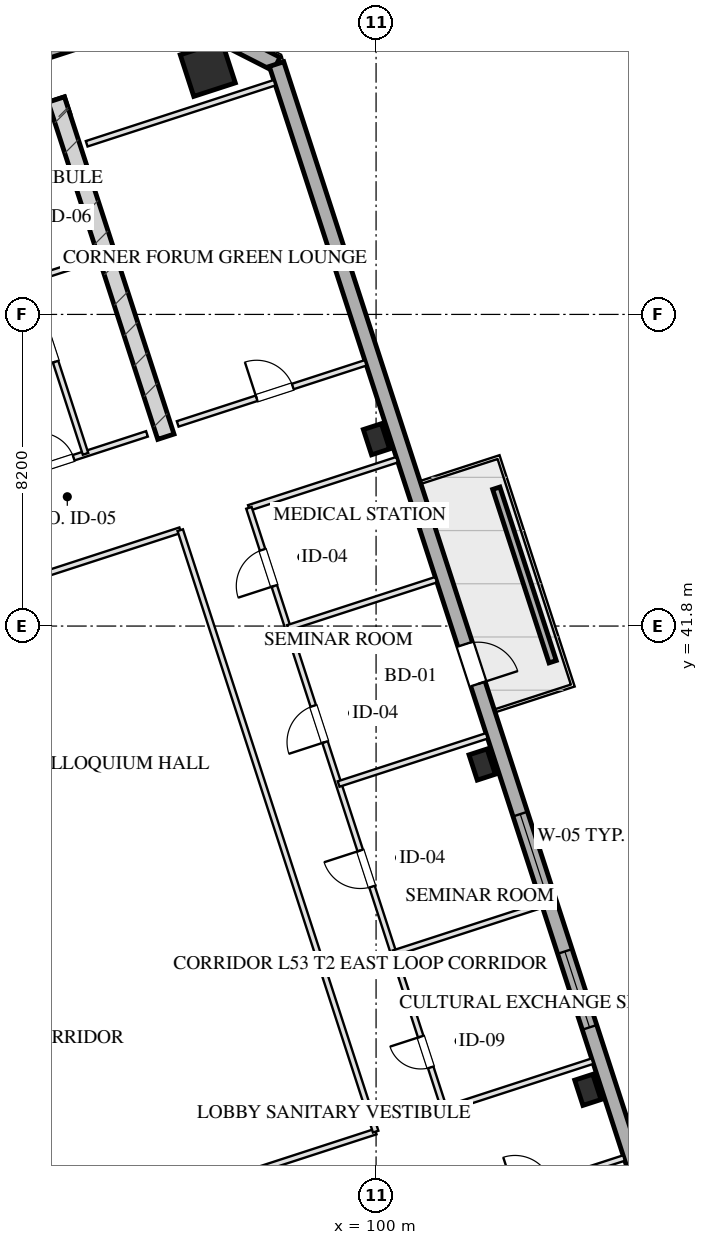
"""IFC4 building model, lengths in metres.
Left out: names, types, materials, properties, quantities, classifications, styles, units other than length and angle.
Written with IfcOpenShell. Run it as: python <this file> out.ifc"""

import sys

from ifc_helpers import new_model, si_unit, direction, frame, frame_2d, origin, origin_2d, place, context, subcontext, project, spatial, rectangle, hollow_rectangle, extrude, element, fill, save


model = new_model("IFC4")
c1 = context("Model", 3, precision=1e-05, world=origin(), true_north=direction((0.0, 1.0)))
c2 = subcontext(c1, "Body", "Model", "MODEL_VIEW")
j1 = project(units=[si_unit("LENGTHUNIT", "METRE"), si_unit("PLANEANGLEUNIT", "RADIAN")], contexts=[c1])
p1 = place(None, origin())
s1 = spatial("IfcSite", under=j1, at=p1, CompositionType="ELEMENT")
p2 = place(p1, origin())
s2 = spatial("IfcBuilding", under=s1, at=p2, CompositionType="ELEMENT")
p3 = place(p2, frame((0.0, 0.0, 198.95)))
s3 = spatial("IfcBuildingStorey", under=s2, at=p3, CompositionType="ELEMENT", Elevation=198.95)
p4 = place(p3, frame((76.415, 50.489, 0.0), z_axis=(0.0, 0.0, 1.0), x_axis=(0.951056810414, 0.309016089169, 0.0)))
e1 = element("IfcWall", 1, at=p4, inside=s3, PredefinedType="SHEAR", context=c2, shape_type="SweptSolid", body=[
    extrude(rectangle(XDim=16.25, YDim=0.45, at=frame_2d((8.125, 0.0))), origin(), (0.0, 0.0, 1.0), 3.45),
])
p5 = place(p3, frame((94.469, 46.781, 0.0), z_axis=(0.0, 0.0, 1.0), x_axis=(-0.309004419953, 0.951060601881, 0.0)))
e2 = element("IfcWall", 2, at=p5, inside=s3, PredefinedType="SHEAR", context=c2, shape_type="SweptSolid", body=[
    extrude(rectangle(XDim=9.33, YDim=0.45, at=frame_2d((4.665, 0.0))), origin(), (0.0, 0.0, 1.0), 3.45),
])
p6 = place(p3, frame((95.572, 56.461, 0.0), z_axis=(0.0, 0.0, 1.0), x_axis=(0.951056516295, 0.309016994375, 0.0)))
e3 = element("IfcColumn", 3, at=p6, inside=s3, PredefinedType="COLUMN", context=c2, shape_type="SweptSolid", body=[
    extrude(hollow_rectangle(XDim=1.15, YDim=1.15, WallThickness=0.04, at=origin_2d()), origin(), (0.0, 0.0, 1.0), 3.451),
])
for number, where, z_axis, x_axis in (
    (4, (105.573, 29.597, 0.0), (0.0, 0.0, 1.0), (0.951, 0.309, 0.0)),
    (5, (102.792, 38.156, 0.0), (0.0, 0.0, 1.0), (0.951, 0.309, 0.0)),
    (6, (100.01, 46.716, 0.0), (0.0, 0.0, 1.0), (0.951, 0.309, 0.0)),
):
    element("IfcColumn", number, at=place(p3, frame(where, z_axis=z_axis, x_axis=x_axis)), inside=s3, PredefinedType="COLUMN", context=c2, shape_type="SweptSolid", body=[
        extrude(hollow_rectangle(XDim=0.5, YDim=0.7, WallThickness=0.025, at=origin_2d()), origin(), (0.0, 0.0, 1.0), 3.451),
    ])
p7 = place(p3, frame((72.165, 50.706, 0.0), z_axis=(0.0, 0.0, 1.0), x_axis=(0.951058012937, 0.309012388148, 0.0)))
e7 = element("IfcWall", 7, at=p7, inside=s3, PredefinedType="SOLIDWALL", context=c2, shape_type="SweptSolid", body=[
    extrude(rectangle(XDim=23.6, YDim=0.4, at=frame_2d((11.8, 0.0))), origin(), (0.0, 0.0, 1.0), 2.61),
])
p8 = place(p3, frame((94.61, 57.999, 0.0), z_axis=(0.0, 0.0, 1.0), x_axis=(0.890979603174, -0.454043331334, 0.0)))
e8 = element("IfcWall", 8, at=p8, inside=s3, PredefinedType="SOLIDWALL", context=c2, shape_type="SweptSolid", body=[
    extrude(rectangle(XDim=3.111, YDim=0.4, at=frame_2d((1.556, 0.0))), origin(), (0.0, 0.0, 1.0), 2.61),
])
p9 = place(p3, frame((97.382, 56.586, 0.0), z_axis=(0.0, 0.0, 1.0), x_axis=(0.309016491071, -0.951056679828, 0.0)))
e9 = element("IfcWall", 9, at=p9, inside=s3, PredefinedType="SOLIDWALL", context=c2, shape_type="SweptSolid", body=[
    extrude(rectangle(XDim=38.4, YDim=0.4, at=frame_2d((19.2, 0.0))), origin(), (0.0, 0.0, 1.0), 2.61),
])
p10 = place(p9, frame((24.55, 0.0, 0.75)))
e10 = element("IfcOpeningElement", 10, at=p10, cuts=e9, PredefinedType="OPENING", context=c2, shape_type="SweptSolid", body=[
    extrude(rectangle(XDim=2.1, YDim=1.46, at=frame_2d((1.05, 0.73))), frame((0.0, 0.21, 0.0), z_axis=(0.0, -1.0, 0.0), x_axis=(1.0, 0.0, 0.0)), (0.0, 0.0, 1.0), 0.42),
])
p11 = place(p9, frame((20.75, 0.0, 0.75)))
e11 = element("IfcOpeningElement", 11, at=p11, cuts=e9, PredefinedType="OPENING", context=c2, shape_type="SweptSolid", body=[
    extrude(rectangle(XDim=2.1, YDim=1.46, at=frame_2d((1.05, 0.73))), frame((0.0, 0.21, 0.0), z_axis=(0.0, -1.0, 0.0), x_axis=(1.0, 0.0, 0.0)), (0.0, 0.0, 1.0), 0.42),
])
p12 = place(p9, frame((16.05, 0.0, 0.0)))
e12 = element("IfcOpeningElement", 12, at=p12, cuts=e9, PredefinedType="OPENING", context=c2, shape_type="SweptSolid", body=[
    extrude(rectangle(XDim=1.1, YDim=2.15, at=frame_2d((0.55, 1.075))), frame((0.0, 0.21, 0.0), z_axis=(0.0, -1.0, 0.0), x_axis=(1.0, 0.0, 0.0)), (0.0, 0.0, 1.0), 0.42),
])
p13 = place(p3, frame((104.646, 40.862, 0.0), z_axis=(0.0, 0.0, 1.0), x_axis=(-0.309032019345, 0.951051634255, 0.0)))
e13 = element("IfcWall", 13, at=p13, inside=s3, PredefinedType="PARAPET", context=c2, shape_type="SweptSolid", body=[
    extrude(rectangle(XDim=4.8, YDim=0.2, at=frame_2d((2.4, 0.0))), origin(), (0.0, 0.0, 1.0), 0.75),
])
p14 = place(p3, frame((90.928, 45.868, 0.0), z_axis=(0.0, 0.0, 1.0), x_axis=(0.951059297078, 0.309008435874, 0.0)))
e14 = element("IfcWall", 14, at=p14, inside=s3, PredefinedType="PARTITIONING", context=c2, shape_type="SweptSolid", body=[
    extrude(rectangle(XDim=3.2, YDim=0.15, at=frame_2d((1.6, 0.0))), origin(), (0.0, 0.0, 1.0), 3.175),
])
p15 = place(p14, frame((0.22, 0.0, 0.0)))
e15 = element("IfcOpeningElement", 15, at=p15, cuts=e14, PredefinedType="OPENING", context=c2, shape_type="SweptSolid", body=[
    extrude(rectangle(XDim=0.95, YDim=2.05, at=frame_2d((0.475, 1.025))), frame((0.0, 0.085, 0.0), z_axis=(0.0, -1.0, 0.0), x_axis=(1.0, 0.0, 0.0)), (0.0, 0.0, 1.0), 0.17),
])
p16 = place(p3, frame((92.355, 46.331, 0.0), z_axis=(0.0, 0.0, 1.0), x_axis=(-0.309007490203, 0.951059604335, 0.0)))
e16 = element("IfcWall", 16, at=p16, inside=s3, PredefinedType="PARTITIONING", context=c2, shape_type="SweptSolid", body=[
    extrude(rectangle(XDim=8.43, YDim=0.15, at=frame_2d((4.215, 0.0))), origin(), (0.0, 0.0, 1.0), 3.175),
])
p17 = place(p16, frame((2.55, 0.0, 0.0)))
e17 = element("IfcOpeningElement", 17, at=p17, cuts=e16, PredefinedType="OPENING", context=c2, shape_type="SweptSolid", body=[
    extrude(rectangle(XDim=0.95, YDim=2.05, at=frame_2d((0.475, 1.025))), frame((0.0, 0.085, 0.0), z_axis=(0.0, -1.0, 0.0), x_axis=(1.0, 0.0, 0.0)), (0.0, 0.0, 1.0), 0.17),
])
p18 = place(p16, frame((5.8, 0.0, 0.0)))
e18 = element("IfcOpeningElement", 18, at=p18, cuts=e16, PredefinedType="OPENING", context=c2, shape_type="SweptSolid", body=[
    extrude(rectangle(XDim=0.9, YDim=2.05, at=frame_2d((0.45, 1.025))), frame((0.0, 0.085, 0.0), z_axis=(0.0, -1.0, 0.0), x_axis=(1.0, 0.0, 0.0)), (0.0, 0.0, 1.0), 0.17),
])
p19 = place(p3, frame((90.871, 50.896, 0.0), z_axis=(0.0, 0.0, 1.0), x_axis=(0.951054116971, 0.309024378638, 0.0)))
e19 = element("IfcWall", 19, at=p19, inside=s3, PredefinedType="PARTITIONING", context=c2, shape_type="SweptSolid", body=[
    extrude(rectangle(XDim=1.7, YDim=0.15, at=frame_2d((0.85, 0.0))), origin(), (0.0, 0.0, 1.0), 3.175),
])
p20 = place(p3, frame((101.578, 26.196, 0.0), z_axis=(0.0, 0.0, 1.0), x_axis=(0.951064427824, 0.308992644131, 0.0)))
e20 = element("IfcWall", 20, at=p20, inside=s3, PredefinedType="PARTITIONING", context=c2, shape_type="SweptSolid", body=[
    extrude(rectangle(XDim=5.2, YDim=0.15, at=frame_2d((2.6, 0.0))), origin(), (0.0, 0.0, 1.0), 3.175),
])
p21 = place(p20, frame((2.184, 0.0, 0.0)))
e21 = element("IfcOpeningElement", 21, at=p21, cuts=e20, PredefinedType="OPENING", context=c2, shape_type="SweptSolid", body=[
    extrude(rectangle(XDim=1.0, YDim=2.05, at=frame_2d((0.5, 1.025))), frame((0.0, 0.085, 0.0), z_axis=(0.0, -1.0, 0.0), x_axis=(1.0, 0.0, 0.0)), (0.0, 0.0, 1.0), 0.17),
])
p22 = place(p3, frame((92.385, 54.49, 0.0), z_axis=(0.0, 0.0, 1.0), x_axis=(0.951055112834, 0.309021313752, 0.0)))
e22 = element("IfcWall", 22, at=p22, inside=s3, PredefinedType="PARTITIONING", context=c2, shape_type="SweptSolid", body=[
    extrude(rectangle(XDim=5.2, YDim=0.15, at=frame_2d((2.6, 0.0))), origin(), (0.0, 0.0, 1.0), 3.175),
])
p23 = place(p3, frame((94.78, 47.119, 0.0), z_axis=(0.0, 0.0, 1.0), x_axis=(0.951055112834, 0.309021313752, 0.0)))
e23 = element("IfcWall", 23, at=p23, inside=s3, PredefinedType="PARTITIONING", context=c2, shape_type="SweptSolid", body=[
    extrude(rectangle(XDim=5.2, YDim=0.15, at=frame_2d((2.6, 0.0))), origin(), (0.0, 0.0, 1.0), 3.175),
])
p24 = place(p23, frame((2.184, 0.0, 0.0)))
e24 = element("IfcOpeningElement", 24, at=p24, cuts=e23, PredefinedType="OPENING", context=c2, shape_type="SweptSolid", body=[
    extrude(rectangle(XDim=1.0, YDim=2.05, at=frame_2d((0.5, 1.025))), frame((0.0, 0.085, 0.0), z_axis=(0.0, -1.0, 0.0), x_axis=(1.0, 0.0, 0.0)), (0.0, 0.0, 1.0), 0.17),
])
p25 = place(p3, frame((91.097, 25.608, 0.0), z_axis=(0.0, 0.0, 1.0), x_axis=(0.951053063704, 0.309027620156, 0.0)))
e25 = element("IfcWall", 25, at=p25, inside=s3, PredefinedType="PARTITIONING", context=c2, shape_type="SweptSolid", body=[
    extrude(rectangle(XDim=9.35, YDim=0.15, at=frame_2d((4.675, 0.0))), origin(), (0.0, 0.0, 1.0), 3.175),
])
p26 = place(p3, frame((101.796, 29.085, 0.0), z_axis=(0.0, 0.0, 1.0), x_axis=(0.951061634685, 0.309001241148, 0.0)))
e26 = element("IfcWall", 26, at=p26, inside=s3, PredefinedType="PARTITIONING", context=c2, shape_type="SweptSolid", body=[
    extrude(rectangle(XDim=4.1, YDim=0.15, at=frame_2d((2.05, 0.0))), origin(), (0.0, 0.0, 1.0), 3.175),
])
p27 = place(p3, frame((85.955, 41.434, 0.0), z_axis=(0.0, 0.0, 1.0), x_axis=(0.951053063704, 0.309027620156, 0.0)))
e27 = element("IfcWall", 27, at=p27, inside=s3, PredefinedType="PARTITIONING", context=c2, shape_type="SweptSolid", body=[
    extrude(rectangle(XDim=9.35, YDim=0.15, at=frame_2d((4.675, 0.0))), origin(), (0.0, 0.0, 1.0), 3.175),
])
p28 = place(p3, frame((96.654, 44.91, 0.0), z_axis=(0.0, 0.0, 1.0), x_axis=(0.951044133184, 0.309055103076, 0.0)))
e28 = element("IfcWall", 28, at=p28, inside=s3, PredefinedType="PARTITIONING", context=c2, shape_type="SweptSolid", body=[
    extrude(rectangle(XDim=4.1, YDim=0.15, at=frame_2d((2.05, 0.0))), origin(), (0.0, 0.0, 1.0), 3.175),
])
p29 = place(p3, frame((99.989, 28.498, 0.0), z_axis=(0.0, 0.0, 1.0), x_axis=(-0.30901773025, 0.951056277195, 0.0)))
e29 = element("IfcWall", 29, at=p29, inside=s3, PredefinedType="PARTITIONING", context=c2, shape_type="SweptSolid", body=[
    extrude(rectangle(XDim=16.64, YDim=0.15, at=frame_2d((8.32, 0.0))), origin(), (0.0, 0.0, 1.0), 3.175),
])
p30 = place(p3, frame((101.796, 29.085, 0.0), z_axis=(0.0, 0.0, 1.0), x_axis=(-0.309022042254, 0.951054876125, 0.0)))
e30 = element("IfcWall", 30, at=p30, inside=s3, PredefinedType="PARTITIONING", context=c2, shape_type="SweptSolid", body=[
    extrude(rectangle(XDim=16.64, YDim=0.15, at=frame_2d((8.32, 0.0))), origin(), (0.0, 0.0, 1.0), 3.175),
])
p31 = place(p30, frame((1.16, 0.0, 0.0)))
e31 = element("IfcOpeningElement", 31, at=p31, cuts=e30, PredefinedType="OPENING", context=c2, shape_type="SweptSolid", body=[
    extrude(rectangle(XDim=0.85, YDim=2.05, at=frame_2d((0.425, 1.025))), frame((0.0, 0.085, 0.0), z_axis=(0.0, -1.0, 0.0), x_axis=(1.0, 0.0, 0.0)), (0.0, 0.0, 1.0), 0.17),
])
p32 = place(p30, frame((6.16, 0.0, 0.0)))
e32 = element("IfcOpeningElement", 32, at=p32, cuts=e30, PredefinedType="OPENING", context=c2, shape_type="SweptSolid", body=[
    extrude(rectangle(XDim=1.0, YDim=2.05, at=frame_2d((0.5, 1.025))), frame((0.0, 0.085, 0.0), z_axis=(0.0, -1.0, 0.0), x_axis=(1.0, 0.0, 0.0)), (0.0, 0.0, 1.0), 0.17),
])
p33 = place(p30, frame((10.16, 0.0, 0.0)))
e33 = element("IfcOpeningElement", 33, at=p33, cuts=e30, PredefinedType="OPENING", context=c2, shape_type="SweptSolid", body=[
    extrude(rectangle(XDim=1.0, YDim=2.05, at=frame_2d((0.5, 1.025))), frame((0.0, 0.085, 0.0), z_axis=(0.0, -1.0, 0.0), x_axis=(1.0, 0.0, 0.0)), (0.0, 0.0, 1.0), 0.17),
])
p34 = place(p30, frame((14.48, 0.0, 0.0)))
e34 = element("IfcOpeningElement", 34, at=p34, cuts=e30, PredefinedType="OPENING", context=c2, shape_type="SweptSolid", body=[
    extrude(rectangle(XDim=1.0, YDim=2.05, at=frame_2d((0.5, 1.025))), frame((0.0, 0.085, 0.0), z_axis=(0.0, -1.0, 0.0), x_axis=(1.0, 0.0, 0.0)), (0.0, 0.0, 1.0), 0.17),
])
p35 = place(p3, frame((100.461, 33.193, 0.0), z_axis=(0.0, 0.0, 1.0), x_axis=(0.951061634685, 0.309001241148, 0.0)))
e35 = element("IfcWall", 35, at=p35, inside=s3, PredefinedType="PARTITIONING", context=c2, shape_type="SweptSolid", body=[
    extrude(rectangle(XDim=4.1, YDim=0.15, at=frame_2d((2.05, 0.0))), origin(), (0.0, 0.0, 1.0), 3.175),
])
for number, where, z_axis, x_axis in (
    (36, (99.015, 37.644, 0.0), (0.0, 0.0, 1.0), (0.951, 0.309, 0.0)),
    (37, (97.68, 41.753, 0.0), (0.0, 0.0, 1.0), (0.951, 0.309, 0.0)),
):
    element("IfcWall", number, at=place(p3, frame(where, z_axis=z_axis, x_axis=x_axis)), inside=s3, PredefinedType="PARTITIONING", context=c2, shape_type="SweptSolid", body=[
        extrude(rectangle(XDim=4.1, YDim=0.15, at=frame_2d((2.05, 0.0))), origin(), (0.0, 0.0, 1.0), 3.175),
    ])
p36 = place(p10, origin())
e38 = element("IfcWindow", 38, at=p36, inside=s3, PartitioningType="TRIPLE_PANEL_VERTICAL", PredefinedType="WINDOW", context=c2, shape_type="SweptSolid", body=[
    extrude(rectangle(XDim=2.1, YDim=1.46, at=frame_2d((1.05, 0.73))), frame((0.0, 0.03, 0.0), z_axis=(0.0, -1.0, 0.0), x_axis=(1.0, 0.0, 0.0)), (0.0, 0.0, 1.0), 0.06),
])
fill(e10, e38)
p37 = place(p11, origin())
e39 = element("IfcWindow", 39, at=p37, inside=s3, PartitioningType="TRIPLE_PANEL_VERTICAL", PredefinedType="WINDOW", context=c2, shape_type="SweptSolid", body=[
    extrude(rectangle(XDim=2.1, YDim=1.46, at=frame_2d((1.05, 0.73))), frame((0.0, 0.03, 0.0), z_axis=(0.0, -1.0, 0.0), x_axis=(1.0, 0.0, 0.0)), (0.0, 0.0, 1.0), 0.06),
])
fill(e11, e39)
p38 = place(p12, origin())
e40 = element("IfcDoor", 40, at=p38, inside=s3, OperationType="SINGLE_SWING_RIGHT", PredefinedType="DOOR", context=c2, shape_type="SweptSolid", body=[
    extrude(rectangle(XDim=1.1, YDim=2.15, at=frame_2d((0.55, 1.075))), frame((0.0, 0.025, 0.0), z_axis=(0.0, -1.0, 0.0), x_axis=(1.0, 0.0, 0.0)), (0.0, 0.0, 1.0), 0.05),
])
fill(e12, e40)
p39 = place(p15, origin())
e41 = element("IfcDoor", 41, at=p39, inside=s3, OperationType="SINGLE_SWING_LEFT", PredefinedType="DOOR", context=c2, shape_type="SweptSolid", body=[
    extrude(rectangle(XDim=0.95, YDim=2.05, at=frame_2d((0.475, 1.025))), frame((0.0, 0.025, 0.0), z_axis=(0.0, -1.0, 0.0), x_axis=(1.0, 0.0, 0.0)), (0.0, 0.0, 1.0), 0.05),
])
fill(e15, e41)
p40 = place(p17, origin())
e42 = element("IfcDoor", 42, at=p40, inside=s3, OperationType="SINGLE_SWING_LEFT", PredefinedType="DOOR", context=c2, shape_type="SweptSolid", body=[
    extrude(rectangle(XDim=0.95, YDim=2.05, at=frame_2d((0.475, 1.025))), frame((0.0, 0.025, 0.0), z_axis=(0.0, -1.0, 0.0), x_axis=(1.0, 0.0, 0.0)), (0.0, 0.0, 1.0), 0.05),
])
fill(e17, e42)
p41 = place(p24, origin())
e43 = element("IfcDoor", 43, at=p41, inside=s3, OperationType="SINGLE_SWING_LEFT", PredefinedType="DOOR", context=c2, shape_type="SweptSolid", body=[
    extrude(rectangle(XDim=1.0, YDim=2.05, at=frame_2d((0.5, 1.025))), frame((0.0, 0.025, 0.0), z_axis=(0.0, -1.0, 0.0), x_axis=(1.0, 0.0, 0.0)), (0.0, 0.0, 1.0), 0.05),
])
fill(e24, e43)
p42 = place(p31, origin())
e44 = element("IfcDoor", 44, at=p42, inside=s3, OperationType="SINGLE_SWING_RIGHT", PredefinedType="DOOR", context=c2, shape_type="SweptSolid", body=[
    extrude(rectangle(XDim=0.85, YDim=2.05, at=frame_2d((0.425, 1.025))), frame((0.0, 0.025, 0.0), z_axis=(0.0, -1.0, 0.0), x_axis=(1.0, 0.0, 0.0)), (0.0, 0.0, 1.0), 0.05),
])
fill(e31, e44)
p43 = place(p32, origin())
e45 = element("IfcDoor", 45, at=p43, inside=s3, OperationType="SINGLE_SWING_RIGHT", PredefinedType="DOOR", context=c2, shape_type="SweptSolid", body=[
    extrude(rectangle(XDim=1.0, YDim=2.05, at=frame_2d((0.5, 1.025))), frame((0.0, 0.025, 0.0), z_axis=(0.0, -1.0, 0.0), x_axis=(1.0, 0.0, 0.0)), (0.0, 0.0, 1.0), 0.05),
])
fill(e32, e45)
p44 = place(p33, origin())
e46 = element("IfcDoor", 46, at=p44, inside=s3, OperationType="SINGLE_SWING_LEFT", PredefinedType="DOOR", context=c2, shape_type="SweptSolid", body=[
    extrude(rectangle(XDim=1.0, YDim=2.05, at=frame_2d((0.5, 1.025))), frame((0.0, 0.025, 0.0), z_axis=(0.0, -1.0, 0.0), x_axis=(1.0, 0.0, 0.0)), (0.0, 0.0, 1.0), 0.05),
])
fill(e33, e46)
p45 = place(p34, origin())
e47 = element("IfcDoor", 47, at=p45, inside=s3, OperationType="SINGLE_SWING_LEFT", PredefinedType="DOOR", context=c2, shape_type="SweptSolid", body=[
    extrude(rectangle(XDim=1.0, YDim=2.05, at=frame_2d((0.5, 1.025))), frame((0.0, 0.025, 0.0), z_axis=(0.0, -1.0, 0.0), x_axis=(1.0, 0.0, 0.0)), (0.0, 0.0, 1.0), 0.05),
])
fill(e34, e47)
save(model, sys.argv[1])
